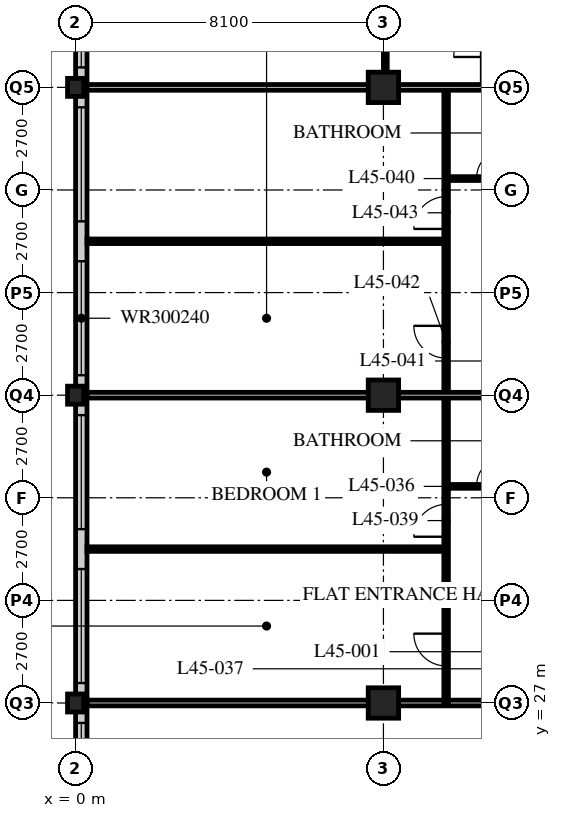
"""IFC4 building model, lengths in metres.
Left out: names, types, materials, properties, quantities, classifications, styles, units other than length and angle.
Written with IfcOpenShell. Run it as: python <this file> out.ifc"""

import sys

from ifc_helpers import new_model, si_unit, direction, frame, frame_2d, origin, origin_2d, place, context, subcontext, project, spatial, rectangle, hollow_rectangle, i_section, extrude, element, fill, save


model = new_model("IFC4")
c1 = context("Model", 3, precision=1e-05, world=origin(), true_north=direction((0.0, 1.0)))
c2 = subcontext(c1, "Body", "Model", "MODEL_VIEW")
j1 = project(units=[si_unit("LENGTHUNIT", "METRE"), si_unit("PLANEANGLEUNIT", "RADIAN")], contexts=[c1])
p1 = place(None, origin())
s1 = spatial("IfcSite", under=j1, at=p1, CompositionType="ELEMENT")
p2 = place(p1, origin())
s2 = spatial("IfcBuilding", under=s1, at=p2, CompositionType="ELEMENT")
p3 = place(p2, frame((0.0, 0.0, 177.6)))
s3 = spatial("IfcBuildingStorey", under=s2, at=p3, CompositionType="ELEMENT", Elevation=177.6)
for number, where, z_axis, x_axis in (
    (1, (0.0, 27.0, 0.0), (0.0, 0.0, 1.0), (1.0, 0.0, 0.0)),
    (2, (0.0, 35.1, 0.0), (0.0, 0.0, 1.0), (1.0, 0.0, 0.0)),
    (3, (0.0, 43.2, 0.0), (0.0, 0.0, 1.0), (1.0, 0.0, 0.0)),
):
    element("IfcColumn", number, at=place(p3, frame(where, z_axis=z_axis, x_axis=x_axis)), inside=s3, PredefinedType="COLUMN", context=c2, shape_type="SweptSolid", body=[
        extrude(i_section(OverallWidth=0.424, OverallDepth=0.475, WebThickness=0.048, FlangeThickness=0.077, FilletRadius=0.015, at=origin_2d()), origin(), (0.0, 0.0, 1.0), 3.6),
    ])
for number, where, z_axis, x_axis in (
    (4, (8.1, 27.0, 0.0), (0.0, 0.0, 1.0), (1.0, 0.0, 0.0)),
    (5, (8.1, 35.1, 0.0), (0.0, 0.0, 1.0), (1.0, 0.0, 0.0)),
    (6, (8.1, 43.2, 0.0), (0.0, 0.0, 1.0), (1.0, 0.0, 0.0)),
):
    element("IfcColumn", number, at=place(p3, frame(where, z_axis=z_axis, x_axis=x_axis)), inside=s3, PredefinedType="COLUMN", context=c2, shape_type="SweptSolid", body=[
        extrude(hollow_rectangle(XDim=0.8, YDim=0.8, WallThickness=0.08, at=origin_2d()), origin(), (0.0, 0.0, 1.0), 3.6),
    ])
p4 = place(p3, frame((0.15, 51.0, 0.0), z_axis=(0.0, 0.0, 1.0), x_axis=(0.0, -1.0, 0.0)))
e7 = element("IfcWall", 7, at=p4, inside=s3, PredefinedType="SOLIDWALL", context=c2, shape_type="SweptSolid", body=[
    extrude(rectangle(XDim=32.1, YDim=0.3, at=frame_2d((16.05, 0.0))), origin(), (0.0, 0.0, 1.0), 3.39),
])
p5 = place(p4, frame((0.225, 0.0, 0.6)))
e8 = element("IfcOpeningElement", 8, at=p5, cuts=e7, PredefinedType="OPENING", context=c2, shape_type="SweptSolid", body=[
    extrude(rectangle(XDim=3.0, YDim=2.4, at=frame_2d((1.5, 1.2))), frame((0.0, 0.16, 0.0), z_axis=(0.0, -1.0, 0.0), x_axis=(1.0, 0.0, 0.0)), (0.0, 0.0, 1.0), 0.32),
])
p6 = place(p4, frame((4.275, 0.0, 0.6)))
e9 = element("IfcOpeningElement", 9, at=p6, cuts=e7, PredefinedType="OPENING", context=c2, shape_type="SweptSolid", body=[
    extrude(rectangle(XDim=3.0, YDim=2.4, at=frame_2d((1.5, 1.2))), frame((0.0, 0.16, 0.0), z_axis=(0.0, -1.0, 0.0), x_axis=(1.0, 0.0, 0.0)), (0.0, 0.0, 1.0), 0.32),
])
p7 = place(p4, frame((8.325, 0.0, 0.6)))
e10 = element("IfcOpeningElement", 10, at=p7, cuts=e7, PredefinedType="OPENING", context=c2, shape_type="SweptSolid", body=[
    extrude(rectangle(XDim=3.0, YDim=2.4, at=frame_2d((1.5, 1.2))), frame((0.0, 0.16, 0.0), z_axis=(0.0, -1.0, 0.0), x_axis=(1.0, 0.0, 0.0)), (0.0, 0.0, 1.0), 0.32),
])
p8 = place(p4, frame((12.375, 0.0, 0.6)))
e11 = element("IfcOpeningElement", 11, at=p8, cuts=e7, PredefinedType="OPENING", context=c2, shape_type="SweptSolid", body=[
    extrude(rectangle(XDim=3.0, YDim=2.4, at=frame_2d((1.5, 1.2))), frame((0.0, 0.16, 0.0), z_axis=(0.0, -1.0, 0.0), x_axis=(1.0, 0.0, 0.0)), (0.0, 0.0, 1.0), 0.32),
])
p9 = place(p4, frame((16.425, 0.0, 0.6)))
e12 = element("IfcOpeningElement", 12, at=p9, cuts=e7, PredefinedType="OPENING", context=c2, shape_type="SweptSolid", body=[
    extrude(rectangle(XDim=3.0, YDim=2.4, at=frame_2d((1.5, 1.2))), frame((0.0, 0.16, 0.0), z_axis=(0.0, -1.0, 0.0), x_axis=(1.0, 0.0, 0.0)), (0.0, 0.0, 1.0), 0.32),
])
p10 = place(p4, frame((20.475, 0.0, 0.6)))
e13 = element("IfcOpeningElement", 13, at=p10, cuts=e7, PredefinedType="OPENING", context=c2, shape_type="SweptSolid", body=[
    extrude(rectangle(XDim=3.0, YDim=2.4, at=frame_2d((1.5, 1.2))), frame((0.0, 0.16, 0.0), z_axis=(0.0, -1.0, 0.0), x_axis=(1.0, 0.0, 0.0)), (0.0, 0.0, 1.0), 0.32),
])
p11 = place(p4, frame((24.525, 0.0, 0.6)))
e14 = element("IfcOpeningElement", 14, at=p11, cuts=e7, PredefinedType="OPENING", context=c2, shape_type="SweptSolid", body=[
    extrude(rectangle(XDim=3.0, YDim=2.4, at=frame_2d((1.5, 1.2))), frame((0.0, 0.16, 0.0), z_axis=(0.0, -1.0, 0.0), x_axis=(1.0, 0.0, 0.0)), (0.0, 0.0, 1.0), 0.32),
])
p12 = place(p4, frame((28.575, 0.0, 0.6)))
e15 = element("IfcOpeningElement", 15, at=p12, cuts=e7, PredefinedType="OPENING", context=c2, shape_type="SweptSolid", body=[
    extrude(rectangle(XDim=3.0, YDim=2.4, at=frame_2d((1.5, 1.2))), frame((0.0, 0.16, 0.0), z_axis=(0.0, -1.0, 0.0), x_axis=(1.0, 0.0, 0.0)), (0.0, 0.0, 1.0), 0.32),
])
p13 = place(p3, frame((12.15, 27.0, 0.0), z_axis=(0.0, 0.0, 1.0), x_axis=(-1.0, 0.0, 0.0)))
e16 = element("IfcWall", 16, at=p13, inside=s3, PredefinedType="PARTITIONING", context=c2, shape_type="SweptSolid", body=[
    extrude(rectangle(XDim=11.85, YDim=0.15, at=frame_2d((5.925, 0.0))), origin(), (0.0, 0.0, 1.0), 2.778),
])
p14 = place(p3, frame((9.75, 27.0, 0.0), z_axis=(0.0, 0.0, 1.0), x_axis=(0.0, 1.0, 0.0)))
e17 = element("IfcWall", 17, at=p14, inside=s3, PredefinedType="PARTITIONING", context=c2, shape_type="SweptSolid", body=[
    extrude(rectangle(XDim=16.2, YDim=0.12, at=frame_2d((8.1, 0.0))), origin(), (0.0, 0.0, 1.0), 3.39),
])
p15 = place(p14, frame((0.975, 0.0, 0.0)))
e18 = element("IfcOpeningElement", 18, at=p15, cuts=e17, PredefinedType="OPENING", context=c2, shape_type="SweptSolid", body=[
    extrude(rectangle(XDim=0.85, YDim=2.1, at=frame_2d((0.425, 1.05))), frame((0.0, 0.07, 0.0), z_axis=(0.0, -1.0, 0.0), x_axis=(1.0, 0.0, 0.0)), (0.0, 0.0, 1.0), 0.14),
])
p16 = place(p14, frame((4.375, 0.0, 0.0)))
e19 = element("IfcOpeningElement", 19, at=p16, cuts=e17, PredefinedType="OPENING", context=c2, shape_type="SweptSolid", body=[
    extrude(rectangle(XDim=0.85, YDim=2.1, at=frame_2d((0.425, 1.05))), frame((0.0, 0.07, 0.0), z_axis=(0.0, -1.0, 0.0), x_axis=(1.0, 0.0, 0.0)), (0.0, 0.0, 1.0), 0.14),
])
p17 = place(p14, frame((9.075, 0.0, 0.0)))
e20 = element("IfcOpeningElement", 20, at=p17, cuts=e17, PredefinedType="OPENING", context=c2, shape_type="SweptSolid", body=[
    extrude(rectangle(XDim=0.85, YDim=2.1, at=frame_2d((0.425, 1.05))), frame((0.0, 0.07, 0.0), z_axis=(0.0, -1.0, 0.0), x_axis=(1.0, 0.0, 0.0)), (0.0, 0.0, 1.0), 0.14),
])
p18 = place(p14, frame((12.475, 0.0, 0.0)))
e21 = element("IfcOpeningElement", 21, at=p18, cuts=e17, PredefinedType="OPENING", context=c2, shape_type="SweptSolid", body=[
    extrude(rectangle(XDim=0.85, YDim=2.1, at=frame_2d((0.425, 1.05))), frame((0.0, 0.07, 0.0), z_axis=(0.0, -1.0, 0.0), x_axis=(1.0, 0.0, 0.0)), (0.0, 0.0, 1.0), 0.14),
])
p19 = place(p3, frame((12.15, 32.7, 0.0), z_axis=(0.0, 0.0, 1.0), x_axis=(-1.0, 0.0, 0.0)))
e22 = element("IfcWall", 22, at=p19, inside=s3, PredefinedType="PARTITIONING", context=c2, shape_type="SweptSolid", body=[
    extrude(rectangle(XDim=2.4, YDim=0.1, at=frame_2d((1.2, 0.0))), origin(), (0.0, 0.0, 1.0), 3.39),
])
p20 = place(p19, frame((0.8, 0.0, 0.0)))
e23 = element("IfcOpeningElement", 23, at=p20, cuts=e22, PredefinedType="OPENING", context=c2, shape_type="SweptSolid", body=[
    extrude(rectangle(XDim=0.8, YDim=2.1, at=frame_2d((0.4, 1.05))), frame((0.0, 0.06, 0.0), z_axis=(0.0, -1.0, 0.0), x_axis=(1.0, 0.0, 0.0)), (0.0, 0.0, 1.0), 0.12),
])
p21 = place(p3, frame((9.75, 31.05, 0.0), z_axis=(0.0, 0.0, 1.0), x_axis=(-1.0, 0.0, 0.0)))
e24 = element("IfcWall", 24, at=p21, inside=s3, PredefinedType="PARTITIONING", context=c2, shape_type="SweptSolid", body=[
    extrude(rectangle(XDim=9.45, YDim=0.12, at=frame_2d((4.725, 0.0))), origin(), (0.0, 0.0, 1.0), 3.39),
])
p22 = place(p3, frame((12.15, 35.1, 0.0), z_axis=(0.0, 0.0, 1.0), x_axis=(-1.0, 0.0, 0.0)))
e25 = element("IfcWall", 25, at=p22, inside=s3, PredefinedType="PARTITIONING", context=c2, shape_type="SweptSolid", body=[
    extrude(rectangle(XDim=11.85, YDim=0.15, at=frame_2d((5.925, 0.0))), origin(), (0.0, 0.0, 1.0), 2.778),
])
p23 = place(p3, frame((12.15, 40.8, 0.0), z_axis=(0.0, 0.0, 1.0), x_axis=(-1.0, 0.0, 0.0)))
e26 = element("IfcWall", 26, at=p23, inside=s3, PredefinedType="PARTITIONING", context=c2, shape_type="SweptSolid", body=[
    extrude(rectangle(XDim=2.4, YDim=0.1, at=frame_2d((1.2, 0.0))), origin(), (0.0, 0.0, 1.0), 3.39),
])
p24 = place(p23, frame((0.8, 0.0, 0.0)))
e27 = element("IfcOpeningElement", 27, at=p24, cuts=e26, PredefinedType="OPENING", context=c2, shape_type="SweptSolid", body=[
    extrude(rectangle(XDim=0.8, YDim=2.1, at=frame_2d((0.4, 1.05))), frame((0.0, 0.06, 0.0), z_axis=(0.0, -1.0, 0.0), x_axis=(1.0, 0.0, 0.0)), (0.0, 0.0, 1.0), 0.12),
])
p25 = place(p3, frame((9.75, 39.15, 0.0), z_axis=(0.0, 0.0, 1.0), x_axis=(-1.0, 0.0, 0.0)))
e28 = element("IfcWall", 28, at=p25, inside=s3, PredefinedType="PARTITIONING", context=c2, shape_type="SweptSolid", body=[
    extrude(rectangle(XDim=9.45, YDim=0.12, at=frame_2d((4.725, 0.0))), origin(), (0.0, 0.0, 1.0), 3.39),
])
p26 = place(p3, frame((8.15, 43.2, 0.0), z_axis=(0.0, 0.0, 1.0), x_axis=(0.0, 1.0, 0.0)))
e29 = element("IfcWall", 29, at=p26, inside=s3, PredefinedType="PARTITIONING", context=c2, shape_type="SweptSolid", body=[
    extrude(rectangle(XDim=2.4, YDim=0.1, at=frame_2d((1.2, 0.0))), origin(), (0.0, 0.0, 1.0), 2.778),
])
p27 = place(p3, frame((0.3, 43.2, 0.0), z_axis=(0.0, 0.0, 1.0), x_axis=(1.0, 0.0, 0.0)))
e30 = element("IfcWall", 30, at=p27, inside=s3, PredefinedType="PARTITIONING", context=c2, shape_type="SweptSolid", body=[
    extrude(rectangle(XDim=11.85, YDim=0.15, at=frame_2d((5.925, 0.0))), origin(), (0.0, 0.0, 1.0), 2.778),
])
p28 = place(p6, origin())
e31 = element("IfcWindow", 31, at=p28, inside=s3, PartitioningType="SINGLE_PANEL", PredefinedType="WINDOW", context=c2, shape_type="SweptSolid", body=[
    extrude(rectangle(XDim=3.0, YDim=2.4, at=frame_2d((1.5, 1.2))), frame((0.0, 0.03, 0.0), z_axis=(0.0, -1.0, 0.0), x_axis=(1.0, 0.0, 0.0)), (0.0, 0.0, 1.0), 0.06),
])
fill(e9, e31)
p29 = place(p7, origin())
e32 = element("IfcWindow", 32, at=p29, inside=s3, PartitioningType="SINGLE_PANEL", PredefinedType="WINDOW", context=c2, shape_type="SweptSolid", body=[
    extrude(rectangle(XDim=3.0, YDim=2.4, at=frame_2d((1.5, 1.2))), frame((0.0, 0.03, 0.0), z_axis=(0.0, -1.0, 0.0), x_axis=(1.0, 0.0, 0.0)), (0.0, 0.0, 1.0), 0.06),
])
fill(e10, e32)
p30 = place(p8, origin())
e33 = element("IfcWindow", 33, at=p30, inside=s3, PartitioningType="SINGLE_PANEL", PredefinedType="WINDOW", context=c2, shape_type="SweptSolid", body=[
    extrude(rectangle(XDim=3.0, YDim=2.4, at=frame_2d((1.5, 1.2))), frame((0.0, 0.03, 0.0), z_axis=(0.0, -1.0, 0.0), x_axis=(1.0, 0.0, 0.0)), (0.0, 0.0, 1.0), 0.06),
])
fill(e11, e33)
p31 = place(p9, origin())
e34 = element("IfcWindow", 34, at=p31, inside=s3, PartitioningType="SINGLE_PANEL", PredefinedType="WINDOW", context=c2, shape_type="SweptSolid", body=[
    extrude(rectangle(XDim=3.0, YDim=2.4, at=frame_2d((1.5, 1.2))), frame((0.0, 0.03, 0.0), z_axis=(0.0, -1.0, 0.0), x_axis=(1.0, 0.0, 0.0)), (0.0, 0.0, 1.0), 0.06),
])
fill(e12, e34)
p32 = place(p10, origin())
e35 = element("IfcWindow", 35, at=p32, inside=s3, PartitioningType="SINGLE_PANEL", PredefinedType="WINDOW", context=c2, shape_type="SweptSolid", body=[
    extrude(rectangle(XDim=3.0, YDim=2.4, at=frame_2d((1.5, 1.2))), frame((0.0, 0.03, 0.0), z_axis=(0.0, -1.0, 0.0), x_axis=(1.0, 0.0, 0.0)), (0.0, 0.0, 1.0), 0.06),
])
fill(e13, e35)
p33 = place(p11, origin())
e36 = element("IfcWindow", 36, at=p33, inside=s3, PartitioningType="SINGLE_PANEL", PredefinedType="WINDOW", context=c2, shape_type="SweptSolid", body=[
    extrude(rectangle(XDim=3.0, YDim=2.4, at=frame_2d((1.5, 1.2))), frame((0.0, 0.03, 0.0), z_axis=(0.0, -1.0, 0.0), x_axis=(1.0, 0.0, 0.0)), (0.0, 0.0, 1.0), 0.06),
])
fill(e14, e36)
p34 = place(p20, origin())
e37 = element("IfcDoor", 37, at=p34, inside=s3, OperationType="SINGLE_SWING_RIGHT", PredefinedType="DOOR", context=c2, shape_type="SweptSolid", body=[
    extrude(rectangle(XDim=0.8, YDim=2.1, at=frame_2d((0.4, 1.05))), frame((0.0, 0.025, 0.0), z_axis=(0.0, -1.0, 0.0), x_axis=(1.0, 0.0, 0.0)), (0.0, 0.0, 1.0), 0.05),
])
fill(e23, e37)
p35 = place(p15, origin())
e38 = element("IfcDoor", 38, at=p35, inside=s3, OperationType="SINGLE_SWING_RIGHT", PredefinedType="DOOR", context=c2, shape_type="SweptSolid", body=[
    extrude(rectangle(XDim=0.85, YDim=2.1, at=frame_2d((0.425, 1.05))), frame((0.0, 0.025, 0.0), z_axis=(0.0, -1.0, 0.0), x_axis=(1.0, 0.0, 0.0)), (0.0, 0.0, 1.0), 0.05),
])
fill(e18, e38)
p36 = place(p16, origin())
e39 = element("IfcDoor", 39, at=p36, inside=s3, OperationType="SINGLE_SWING_LEFT", PredefinedType="DOOR", context=c2, shape_type="SweptSolid", body=[
    extrude(rectangle(XDim=0.85, YDim=2.1, at=frame_2d((0.425, 1.05))), frame((0.0, 0.025, 0.0), z_axis=(0.0, -1.0, 0.0), x_axis=(1.0, 0.0, 0.0)), (0.0, 0.0, 1.0), 0.05),
])
fill(e19, e39)
p37 = place(p24, origin())
e40 = element("IfcDoor", 40, at=p37, inside=s3, OperationType="SINGLE_SWING_RIGHT", PredefinedType="DOOR", context=c2, shape_type="SweptSolid", body=[
    extrude(rectangle(XDim=0.8, YDim=2.1, at=frame_2d((0.4, 1.05))), frame((0.0, 0.025, 0.0), z_axis=(0.0, -1.0, 0.0), x_axis=(1.0, 0.0, 0.0)), (0.0, 0.0, 1.0), 0.05),
])
fill(e27, e40)
p38 = place(p17, origin())
e41 = element("IfcDoor", 41, at=p38, inside=s3, OperationType="SINGLE_SWING_RIGHT", PredefinedType="DOOR", context=c2, shape_type="SweptSolid", body=[
    extrude(rectangle(XDim=0.85, YDim=2.1, at=frame_2d((0.425, 1.05))), frame((0.0, 0.025, 0.0), z_axis=(0.0, -1.0, 0.0), x_axis=(1.0, 0.0, 0.0)), (0.0, 0.0, 1.0), 0.05),
])
fill(e20, e41)
p39 = place(p18, origin())
e42 = element("IfcDoor", 42, at=p39, inside=s3, OperationType="SINGLE_SWING_LEFT", PredefinedType="DOOR", context=c2, shape_type="SweptSolid", body=[
    extrude(rectangle(XDim=0.85, YDim=2.1, at=frame_2d((0.425, 1.05))), frame((0.0, 0.025, 0.0), z_axis=(0.0, -1.0, 0.0), x_axis=(1.0, 0.0, 0.0)), (0.0, 0.0, 1.0), 0.05),
])
fill(e21, e42)
save(model, sys.argv[1])
